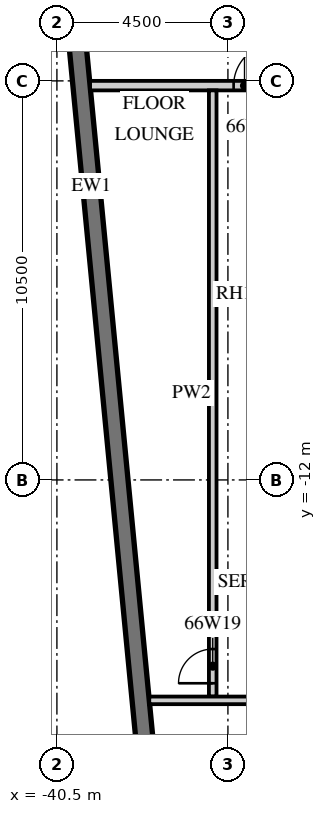
"""IFC4 building model, lengths in metres.
Left out: names, types, materials, properties, quantities, classifications, styles, units other than length and angle.
Written with IfcOpenShell. Run it as: python <this file> out.ifc"""

import sys

from ifc_helpers import new_model, si_unit, direction, frame, frame_2d, origin, place, context, subcontext, project, spatial, rectangle, extrude, element, fill, save


model = new_model("IFC4")
c1 = context("Model", 3, precision=1e-05, world=origin(), true_north=direction((0.0, 1.0)))
c2 = subcontext(c1, "Body", "Model", "MODEL_VIEW")
j1 = project(units=[si_unit("LENGTHUNIT", "METRE"), si_unit("PLANEANGLEUNIT", "RADIAN")], contexts=[c1])
p1 = place(None, origin())
s1 = spatial("IfcSite", under=j1, at=p1, CompositionType="ELEMENT")
p2 = place(p1, origin())
s2 = spatial("IfcBuilding", under=s1, at=p2, CompositionType="ELEMENT")
p3 = place(p2, frame((0.0, 0.0, 268.5)))
s3 = spatial("IfcBuildingStorey", under=s2, at=p3, CompositionType="ELEMENT", Elevation=268.5)
p4 = place(p3, frame((-41.132, 11.658, 0.0), z_axis=(0.0, 0.0, 1.0), x_axis=(0.095847749461, -0.995396006082, 0.0)))
e1 = element("IfcWall", 1, at=p4, inside=s3, PredefinedType="SOLIDWALL", context=c2, shape_type="SweptSolid", body=[
    extrude(rectangle(XDim=32.0, YDim=0.45, at=frame_2d((16.0, 0.0))), origin(), (0.0, 0.0, 1.0), 3.02),
])
p5 = place(p4, frame((2.053, 0.0, 0.45)))
e2 = element("IfcOpeningElement", 2, at=p5, cuts=e1, PredefinedType="OPENING", context=c2, shape_type="SweptSolid", body=[
    extrude(rectangle(XDim=3.3, YDim=2.25, at=frame_2d((1.65, 1.125))), frame((0.0, 0.235, 0.0), z_axis=(0.0, -1.0, 0.0), x_axis=(1.0, 0.0, 0.0)), (0.0, 0.0, 1.0), 0.47),
])
p6 = place(p4, frame((6.574, 0.0, 0.45)))
e3 = element("IfcOpeningElement", 3, at=p6, cuts=e1, PredefinedType="OPENING", context=c2, shape_type="SweptSolid", body=[
    extrude(rectangle(XDim=3.3, YDim=2.25, at=frame_2d((1.65, 1.125))), frame((0.0, 0.235, 0.0), z_axis=(0.0, -1.0, 0.0), x_axis=(1.0, 0.0, 0.0)), (0.0, 0.0, 1.0), 0.47),
])
p7 = place(p3, frame((-39.627, -1.625, 0.0), z_axis=(0.0, 0.0, 1.0), x_axis=(1.0, 0.0, 0.0)))
e4 = element("IfcWall", 4, at=p7, inside=s3, PredefinedType="PARTITIONING", context=c2, shape_type="SweptSolid", body=[
    extrude(rectangle(XDim=8.127, YDim=0.25, at=frame_2d((4.063, 0.0))), origin(), (0.0, 0.0, 1.0), 3.02),
])
p8 = place(p7, frame((6.202, 0.0, 0.0)))
e5 = element("IfcOpeningElement", 5, at=p8, cuts=e4, PredefinedType="OPENING", context=c2, shape_type="SweptSolid", body=[
    extrude(rectangle(XDim=1.3, YDim=2.1, at=frame_2d((0.65, 1.05))), frame((0.0, 0.135, 0.0), z_axis=(0.0, -1.0, 0.0), x_axis=(1.0, 0.0, 0.0)), (0.0, 0.0, 1.0), 0.27),
])
p9 = place(p7, frame((3.777, 0.0, 0.0)))
e6 = element("IfcOpeningElement", 6, at=p9, cuts=e4, PredefinedType="OPENING", context=c2, shape_type="SweptSolid", body=[
    extrude(rectangle(XDim=1.1, YDim=2.1, at=frame_2d((0.55, 1.05))), frame((0.0, 0.135, 0.0), z_axis=(0.0, -1.0, 0.0), x_axis=(1.0, 0.0, 0.0)), (0.0, 0.0, 1.0), 0.27),
])
p10 = place(p3, frame((-36.4, -17.7, 0.0), z_axis=(0.0, 0.0, 1.0), x_axis=(0.0, 1.0, 0.0)))
e7 = element("IfcWall", 7, at=p10, inside=s3, PredefinedType="PARTITIONING", context=c2, shape_type="SweptSolid", body=[
    extrude(rectangle(XDim=15.95, YDim=0.2, at=frame_2d((7.975, 0.0))), origin(), (0.0, 0.0, 1.0), 3.02),
])
p11 = place(p10, frame((0.35, 0.0, 0.0)))
e8 = element("IfcOpeningElement", 8, at=p11, cuts=e7, PredefinedType="OPENING", context=c2, shape_type="SweptSolid", body=[
    extrude(rectangle(XDim=0.9, YDim=2.1, at=frame_2d((0.45, 1.05))), frame((0.0, 0.11, 0.0), z_axis=(0.0, -1.0, 0.0), x_axis=(1.0, 0.0, 0.0)), (0.0, 0.0, 1.0), 0.22),
])
p12 = place(p3, frame((-38.07, -17.8, 0.0), z_axis=(0.0, 0.0, 1.0), x_axis=(1.0, 0.0, 0.0)))
e9 = element("IfcWall", 9, at=p12, inside=s3, PredefinedType="PARTITIONING", context=c2, shape_type="SweptSolid", body=[
    extrude(rectangle(XDim=24.47, YDim=0.2, at=frame_2d((12.235, 0.0))), origin(), (0.0, 0.0, 1.0), 3.02),
])
p13 = place(p12, frame((6.957, 0.0, 0.0)))
e10 = element("IfcOpeningElement", 10, at=p13, cuts=e9, PredefinedType="OPENING", context=c2, shape_type="SweptSolid", body=[
    extrude(rectangle(XDim=0.9, YDim=2.1, at=frame_2d((0.45, 1.05))), frame((0.0, 0.11, 0.0), z_axis=(0.0, -1.0, 0.0), x_axis=(1.0, 0.0, 0.0)), (0.0, 0.0, 1.0), 0.22),
])
p14 = place(p12, frame((15.257, 0.0, 0.0)))
e11 = element("IfcOpeningElement", 11, at=p14, cuts=e9, PredefinedType="OPENING", context=c2, shape_type="SweptSolid", body=[
    extrude(rectangle(XDim=0.9, YDim=2.1, at=frame_2d((0.45, 1.05))), frame((0.0, 0.11, 0.0), z_axis=(0.0, -1.0, 0.0), x_axis=(1.0, 0.0, 0.0)), (0.0, 0.0, 1.0), 0.22),
])
p15 = place(p9, origin())
e12 = element("IfcDoor", 12, at=p15, inside=s3, OperationType="SINGLE_SWING_RIGHT", PredefinedType="DOOR", context=c2, shape_type="SweptSolid", body=[
    extrude(rectangle(XDim=1.1, YDim=2.1, at=frame_2d((0.55, 1.05))), frame((0.0, 0.025, 0.0), z_axis=(0.0, -1.0, 0.0), x_axis=(1.0, 0.0, 0.0)), (0.0, 0.0, 1.0), 0.05),
])
fill(e6, e12)
p16 = place(p11, origin())
e13 = element("IfcDoor", 13, at=p16, inside=s3, OperationType="SINGLE_SWING_LEFT", PredefinedType="DOOR", context=c2, shape_type="SweptSolid", body=[
    extrude(rectangle(XDim=0.9, YDim=2.1, at=frame_2d((0.45, 1.05))), frame((0.0, 0.025, 0.0), z_axis=(0.0, -1.0, 0.0), x_axis=(1.0, 0.0, 0.0)), (0.0, 0.0, 1.0), 0.05),
])
fill(e8, e13)
save(model, sys.argv[1])
